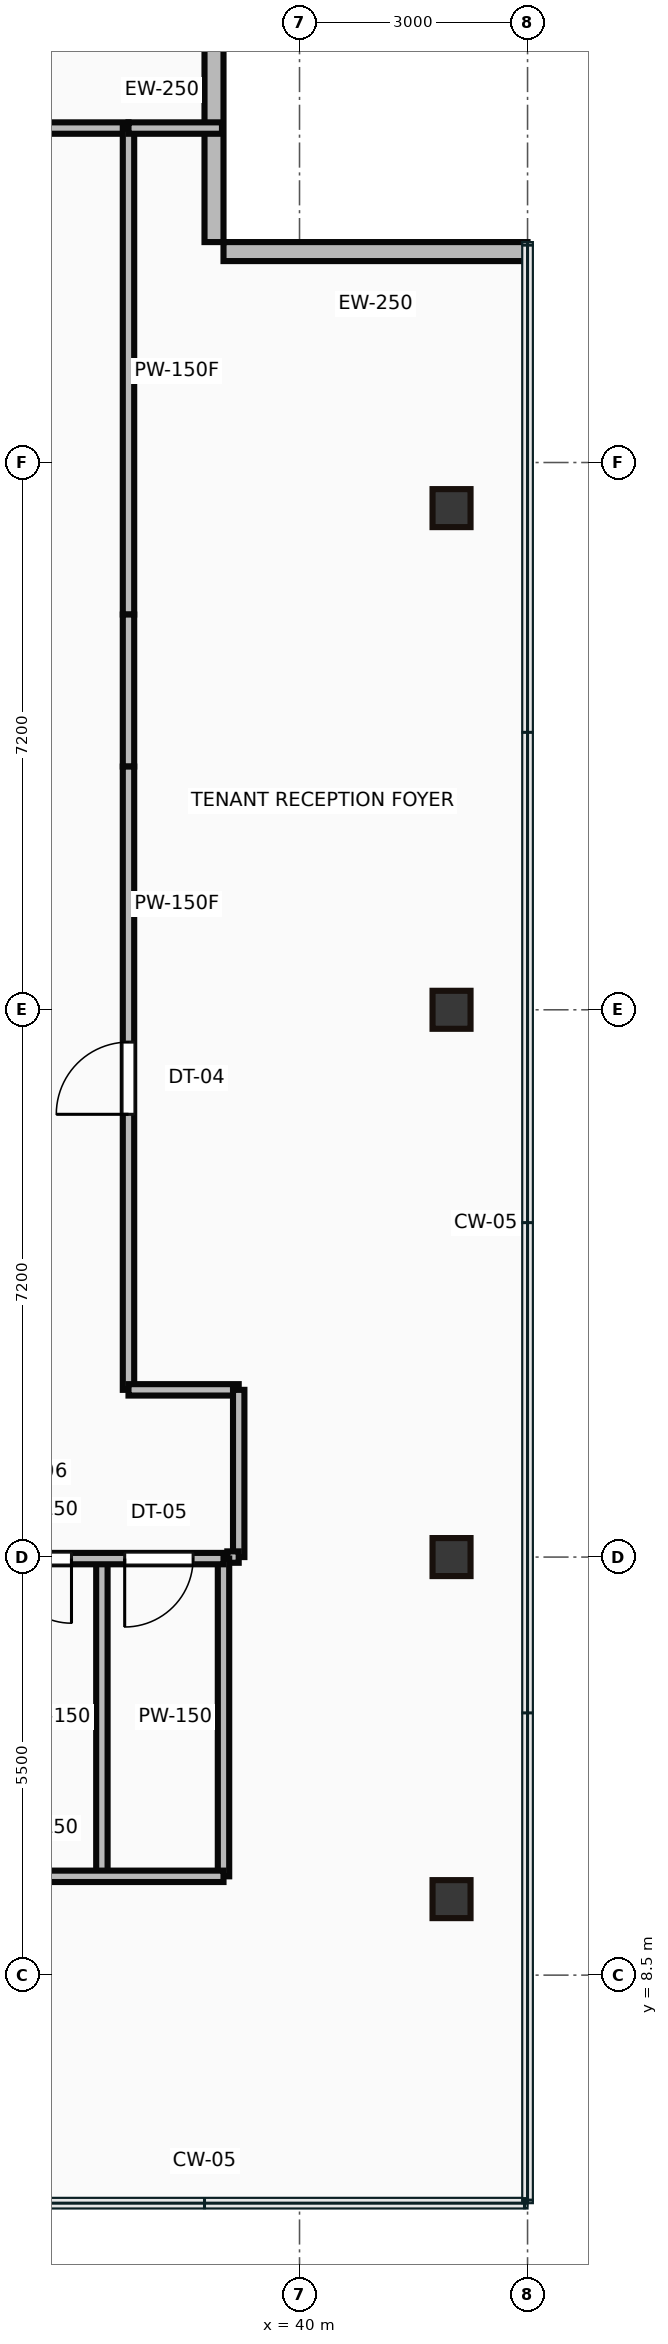
"""IFC4 building model, lengths in metres.
Left out: names, types, materials, properties, quantities, classifications, styles, units other than length and angle.
Written with IfcOpenShell. Run it as: python <this file> out.ifc"""

import sys

from ifc_helpers import new_model, si_unit, direction, frame, frame_2d, origin, origin_2d, place, context, subcontext, project, spatial, rectangle, hollow_rectangle, extrude, source, transform, mapped, element, fill, save


model = new_model("IFC4")
c1 = context("Model", 3, precision=1e-05, world=origin(), true_north=direction((0.0, 1.0)))
c2 = subcontext(c1, "Body", "Model", "MODEL_VIEW")
j1 = project(units=[si_unit("LENGTHUNIT", "METRE"), si_unit("PLANEANGLEUNIT", "RADIAN")], contexts=[c1])
p1 = place(None, origin())
s1 = spatial("IfcSite", under=j1, at=p1, CompositionType="ELEMENT")
p2 = place(p1, origin())
s2 = spatial("IfcBuilding", under=s1, at=p2, CompositionType="ELEMENT")
p3 = place(p2, frame((0.0, 0.0, 280.7)))
s3 = spatial("IfcBuildingStorey", under=s2, at=p3, CompositionType="ELEMENT", Elevation=280.7)
m1 = source(origin(), c2, "Body", "SweptSolid", [
    extrude(hollow_rectangle(XDim=0.5, YDim=0.5, WallThickness=0.022, at=origin_2d()), origin(), (0.0, 0.0, 1.0), 3.65),
])
for number, where, z_axis, x_axis in (
    (1, (42.0, 9.5, 0.0), (0.0, 0.0, 1.0), (1.0, 0.0, 0.0)),
    (2, (42.0, 14.0, 0.0), (0.0, 0.0, 1.0), (1.0, 0.0, 0.0)),
    (3, (42.0, 21.2, 0.0), (0.0, 0.0, 1.0), (1.0, 0.0, 0.0)),
    (4, (42.0, 27.8, 0.0), (0.0, 0.0, 1.0), (1.0, 0.0, 0.0)),
):
    element("IfcColumn", number, at=place(p3, frame(where, z_axis=z_axis, x_axis=x_axis)), inside=s3, PredefinedType="COLUMN", context=c2, shape_type="MappedRepresentation", body=[
        mapped(m1, transform((0.0, 0.0, 0.0))),
    ])
m2 = source(origin(), c2, "Body", "SweptSolid", [
    extrude(rectangle(XDim=4.0, YDim=0.25, at=frame_2d((2.0, 0.0))), origin(), (0.0, 0.0, 1.0), 3.4),
])
for number, where, z_axis, x_axis in (
    (5, (43.0, 31.175, 0.0), (0.0, 0.0, 1.0), (-1.0, 0.0, 0.0)),
    (6, (38.875, 31.3, 0.0), (0.0, 0.0, 1.0), (0.0, 1.0, 0.0)),
):
    element("IfcWall", number, at=place(p3, frame(where, z_axis=z_axis, x_axis=x_axis)), inside=s3, PredefinedType="STANDARD", context=c2, shape_type="MappedRepresentation", body=[
        mapped(m2, transform((0.0, 0.0, 0.0))),
    ])
m3 = source(origin(), c2, "Body", "SweptSolid", [
    extrude(rectangle(XDim=4.8, YDim=0.15, at=frame_2d((2.4, 0.0))), origin(), (0.0, 0.0, 1.0), 2.787),
])
p4 = place(p3, frame((34.2, 13.98, 0.0), z_axis=(0.0, 0.0, 1.0), x_axis=(1.0, 0.0, 0.0)))
e7 = element("IfcWall", 7, at=p4, inside=s3, PredefinedType="PARTITIONING", context=c2, shape_type="MappedRepresentation", body=[
    mapped(m3, transform((0.0, 0.0, 0.0))),
])
p5 = place(p4, frame((0.35, 0.0, 0.0)))
e8 = element("IfcOpeningElement", 8, at=p5, cuts=e7, PredefinedType="OPENING", context=c2, shape_type="SweptSolid", body=[
    extrude(rectangle(XDim=0.85, YDim=2.1, at=frame_2d((0.425, 1.05))), frame((0.0, 0.085, 0.0), z_axis=(0.0, -1.0, 0.0), x_axis=(1.0, 0.0, 0.0)), (0.0, 0.0, 1.0), 0.17),
])
p6 = place(p4, frame((1.95, 0.0, 0.0)))
e9 = element("IfcOpeningElement", 9, at=p6, cuts=e7, PredefinedType="OPENING", context=c2, shape_type="SweptSolid", body=[
    extrude(rectangle(XDim=0.85, YDim=2.1, at=frame_2d((0.425, 1.05))), frame((0.0, 0.085, 0.0), z_axis=(0.0, -1.0, 0.0), x_axis=(1.0, 0.0, 0.0)), (0.0, 0.0, 1.0), 0.17),
])
p7 = place(p4, frame((3.5, 0.0, 0.0)))
e10 = element("IfcOpeningElement", 10, at=p7, cuts=e7, PredefinedType="OPENING", context=c2, shape_type="SweptSolid", body=[
    extrude(rectangle(XDim=0.9, YDim=2.1, at=frame_2d((0.45, 1.05))), frame((0.0, 0.085, 0.0), z_axis=(0.0, -1.0, 0.0), x_axis=(1.0, 0.0, 0.0)), (0.0, 0.0, 1.0), 0.17),
])
m4 = source(origin(), c2, "Body", "SweptSolid", [
    extrude(rectangle(XDim=4.8, YDim=0.15, at=frame_2d((2.4, 0.0))), origin(), (0.0, 0.0, 1.0), 3.4),
])
p8 = place(p3, frame((34.2, 9.8, 0.0), z_axis=(0.0, 0.0, 1.0), x_axis=(1.0, 0.0, 0.0)))
e11 = element("IfcWall", 11, at=p8, inside=s3, PredefinedType="PARTITIONING", context=c2, shape_type="MappedRepresentation", body=[
    mapped(m4, transform((0.0, 0.0, 0.0))),
])
m5 = source(origin(), c2, "Body", "SweptSolid", [
    extrude(rectangle(XDim=4.18, YDim=0.15, at=frame_2d((2.09, 0.0))), origin(), (0.0, 0.0, 1.0), 3.4),
])
for number, where, z_axis, x_axis in (
    (12, (39.0, 9.8, 0.0), (0.0, 0.0, 1.0), (0.0, 1.0, 0.0)),
    (13, (37.4, 9.8, 0.0), (0.0, 0.0, 1.0), (0.0, 1.0, 0.0)),
):
    element("IfcWall", number, at=place(p3, frame(where, z_axis=z_axis, x_axis=x_axis)), inside=s3, PredefinedType="PARTITIONING", context=c2, shape_type="MappedRepresentation", body=[
        mapped(m5, transform((0.0, 0.0, 0.0))),
    ])
m6 = source(origin(), c2, "Body", "SweptSolid", [
    extrude(rectangle(XDim=2.15, YDim=0.15, at=frame_2d((1.075, 0.0))), origin(), (0.0, 0.0, 1.0), 3.4),
])
p9 = place(p3, frame((35.6, 32.8, 0.0), z_axis=(0.0, 0.0, 1.0), x_axis=(1.0, 0.0, 0.0)))
e14 = element("IfcWall", 14, at=p9, inside=s3, PredefinedType="PARTITIONING", context=c2, shape_type="MappedRepresentation", body=[
    mapped(m6, transform((0.0, 0.0, 0.0))),
])
m7 = source(origin(), c2, "Body", "SweptSolid", [
    extrude(rectangle(XDim=6.4, YDim=0.15, at=frame_2d((3.2, 0.0))), origin(), (0.0, 0.0, 1.0), 3.4),
])
p10 = place(p3, frame((37.75, 32.8, 0.0), z_axis=(0.0, 0.0, 1.0), x_axis=(0.0, -1.0, 0.0)))
e15 = element("IfcWall", 15, at=p10, inside=s3, PredefinedType="PARTITIONING", context=c2, shape_type="MappedRepresentation", body=[
    mapped(m7, transform((0.0, 0.0, 0.0))),
])
m8 = source(origin(), c2, "Body", "SweptSolid", [
    extrude(rectangle(XDim=2.0, YDim=0.15, at=frame_2d((1.0, 0.0))), origin(), (0.0, 0.0, 1.0), 3.4),
])
p11 = place(p3, frame((37.75, 26.4, 0.0), z_axis=(0.0, 0.0, 1.0), x_axis=(0.0, -1.0, 0.0)))
e16 = element("IfcWall", 16, at=p11, inside=s3, PredefinedType="PARTITIONING", context=c2, shape_type="MappedRepresentation", body=[
    mapped(m8, transform((0.0, 0.0, 0.0))),
])
m9 = source(origin(), c2, "Body", "SweptSolid", [
    extrude(rectangle(XDim=8.2, YDim=0.15, at=frame_2d((4.1, 0.0))), origin(), (0.0, 0.0, 1.0), 3.4),
])
p12 = place(p3, frame((37.75, 24.4, 0.0), z_axis=(0.0, 0.0, 1.0), x_axis=(0.0, -1.0, 0.0)))
e17 = element("IfcWall", 17, at=p12, inside=s3, PredefinedType="PARTITIONING", context=c2, shape_type="MappedRepresentation", body=[
    mapped(m9, transform((0.0, 0.0, 0.0))),
])
p13 = place(p12, frame((3.625, 0.0, 0.0)))
e18 = element("IfcOpeningElement", 18, at=p13, cuts=e17, PredefinedType="OPENING", context=c2, shape_type="SweptSolid", body=[
    extrude(rectangle(XDim=0.95, YDim=2.15, at=frame_2d((0.475, 1.075))), frame((0.0, 0.085, 0.0), z_axis=(0.0, -1.0, 0.0), x_axis=(1.0, 0.0, 0.0)), (0.0, 0.0, 1.0), 0.17),
])
m10 = source(origin(), c2, "Body", "SweptSolid", [
    extrude(rectangle(XDim=1.45, YDim=0.15, at=frame_2d((0.725, 0.0))), origin(), (0.0, 0.0, 1.0), 3.4),
])
p14 = place(p3, frame((37.75, 16.2, 0.0), z_axis=(0.0, 0.0, 1.0), x_axis=(1.0, 0.0, 0.0)))
e19 = element("IfcWall", 19, at=p14, inside=s3, PredefinedType="PARTITIONING", context=c2, shape_type="MappedRepresentation", body=[
    mapped(m10, transform((0.0, 0.0, 0.0))),
])
m11 = source(origin(), c2, "Body", "SweptSolid", [
    extrude(rectangle(XDim=2.2, YDim=0.15, at=frame_2d((1.1, 0.0))), origin(), (0.0, 0.0, 1.0), 3.4),
])
p15 = place(p3, frame((39.2, 16.2, 0.0), z_axis=(0.0, 0.0, 1.0), x_axis=(0.0, -1.0, 0.0)))
e20 = element("IfcWall", 20, at=p15, inside=s3, PredefinedType="PARTITIONING", context=c2, shape_type="MappedRepresentation", body=[
    mapped(m11, transform((0.0, 0.0, 0.0))),
])
m12 = source(origin(), c2, "Body", "SweptSolid", [
    extrude(rectangle(XDim=0.15, YDim=0.15, at=frame_2d((0.075, 0.0))), origin(), (0.0, 0.0, 1.0), 3.4),
])
p16 = place(p3, frame((39.2, 14.0, 0.0), z_axis=(0.0, 0.0, 1.0), x_axis=(-1.0, 0.0, 0.0)))
e21 = element("IfcWall", 21, at=p16, inside=s3, PredefinedType="PARTITIONING", context=c2, shape_type="MappedRepresentation", body=[
    mapped(m12, transform((0.0, 0.0, 0.0))),
])
m13 = source(origin(), c2, "Body", "SweptSolid", [
    extrude(rectangle(XDim=1.23, YDim=0.15, at=frame_2d((0.615, 0.0))), origin(), (0.0, 0.0, 1.0), 3.4),
])
p17 = place(p3, frame((38.98, 32.8, 0.0), z_axis=(0.0, 0.0, 1.0), x_axis=(-1.0, 0.0, 0.0)))
e22 = element("IfcWall", 22, at=p17, inside=s3, PredefinedType="PARTITIONING", context=c2, shape_type="MappedRepresentation", body=[
    mapped(m13, transform((0.0, 0.0, 0.0))),
])
m14 = source(origin(), c2, "Body", "SweptSolid", [
    extrude(rectangle(XDim=0.85, YDim=2.1, at=frame_2d((0.425, 1.05))), frame((0.0, 0.025, 0.0), z_axis=(0.0, -1.0, 0.0), x_axis=(1.0, 0.0, 0.0)), (0.0, 0.0, 1.0), 0.05),
])
p18 = place(p6, frame((0.85, 0.0, 0.0), z_axis=(0.0, 0.0, 1.0), x_axis=(-1.0, 0.0, 0.0)))
e23 = element("IfcDoor", 23, at=p18, inside=s3, OperationType="SINGLE_SWING_RIGHT", PredefinedType="DOOR", context=c2, shape_type="MappedRepresentation", body=[
    mapped(m14, transform((0.0, 0.0, 0.0))),
])
fill(e9, e23)
m15 = source(origin(), c2, "Body", "SweptSolid", [
    extrude(rectangle(XDim=0.9, YDim=2.1, at=frame_2d((0.45, 1.05))), frame((0.0, 0.025, 0.0), z_axis=(0.0, -1.0, 0.0), x_axis=(1.0, 0.0, 0.0)), (0.0, 0.0, 1.0), 0.05),
])
p19 = place(p7, frame((0.9, 0.0, 0.0), z_axis=(0.0, 0.0, 1.0), x_axis=(-1.0, 0.0, 0.0)))
e24 = element("IfcDoor", 24, at=p19, inside=s3, OperationType="SINGLE_SWING_LEFT", PredefinedType="DOOR", context=c2, shape_type="MappedRepresentation", body=[
    mapped(m15, transform((0.0, 0.0, 0.0))),
])
fill(e10, e24)
m16 = source(origin(), c2, "Body", "SweptSolid", [
    extrude(rectangle(XDim=0.95, YDim=2.15, at=frame_2d((0.475, 1.075))), frame((0.0, 0.025, 0.0), z_axis=(0.0, -1.0, 0.0), x_axis=(1.0, 0.0, 0.0)), (0.0, 0.0, 1.0), 0.05),
])
p20 = place(p13, origin())
e25 = element("IfcDoor", 25, at=p20, inside=s3, OperationType="SINGLE_SWING_RIGHT", PredefinedType="DOOR", context=c2, shape_type="MappedRepresentation", body=[
    mapped(m16, transform((0.0, 0.0, 0.0))),
])
fill(e18, e25)
save(model, sys.argv[1])
